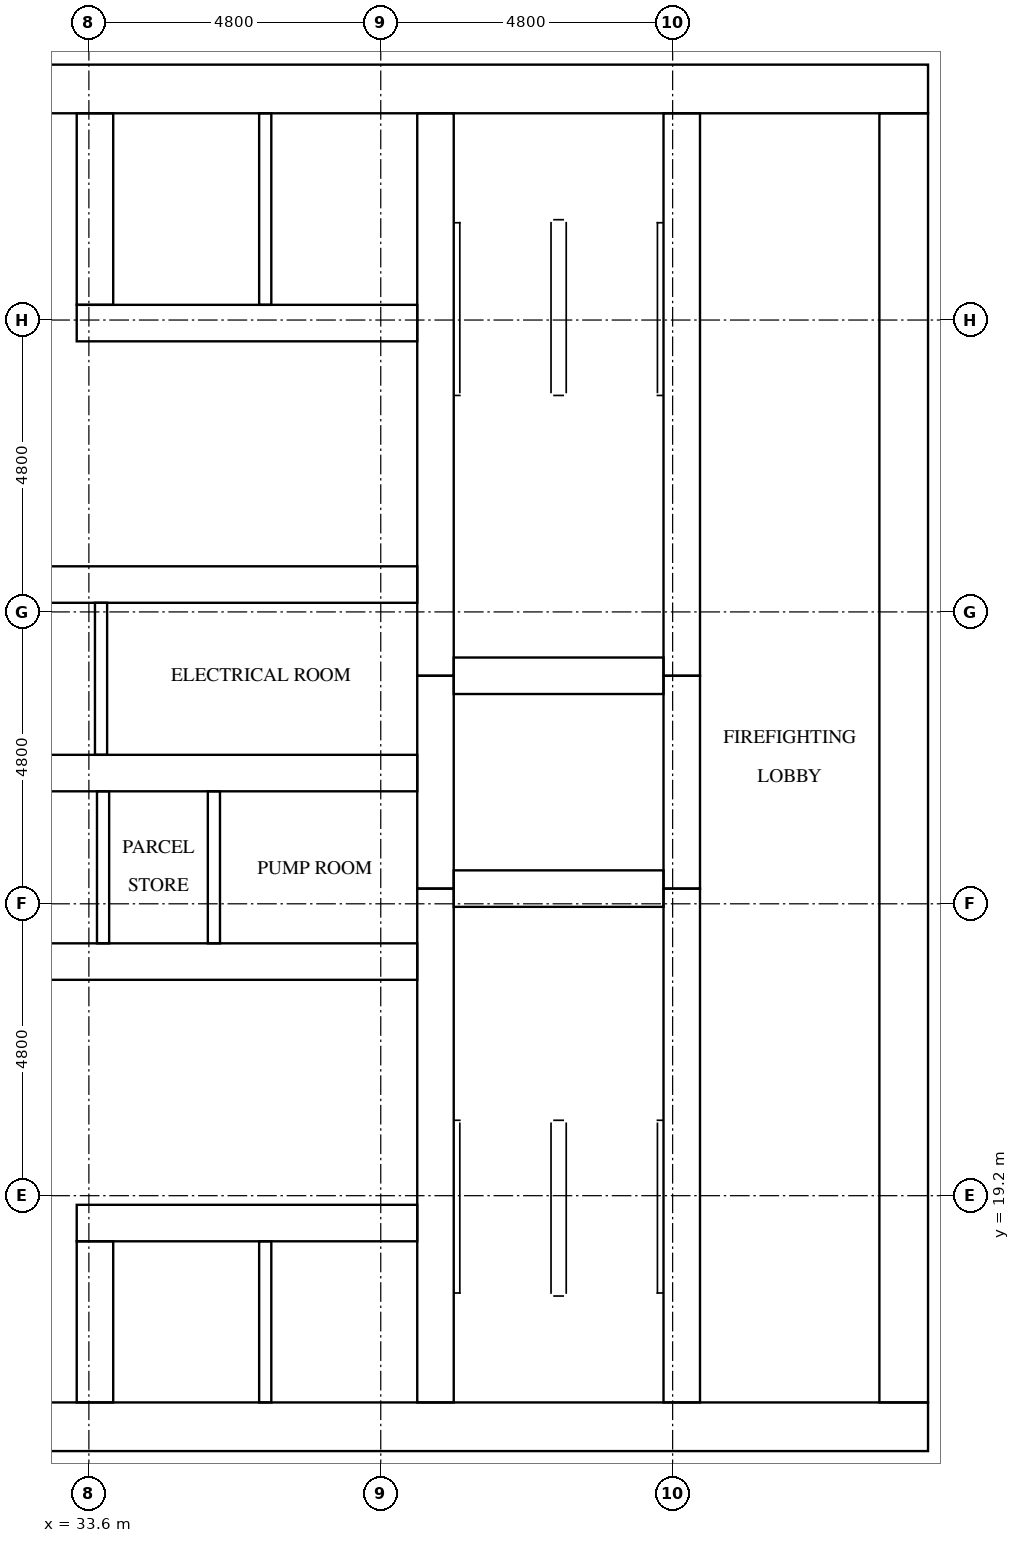
"""IFC4 building model, lengths in metres.
Left out: names, types, materials, properties, quantities, classifications, styles, units other than length and angle.
Written with IfcOpenShell. Run it as: python <this file> out.ifc"""

import sys

from ifc_helpers import new_model, si_unit, direction, frame, frame_2d, origin, place, context, subcontext, project, spatial, rectangle, extrude, element, fill, save


model = new_model("IFC4")
c1 = context("Model", 3, precision=1e-05, world=origin(), true_north=direction((0.0, 1.0)))
c2 = subcontext(c1, "Body", "Model", "MODEL_VIEW")
j1 = project(units=[si_unit("LENGTHUNIT", "METRE"), si_unit("PLANEANGLEUNIT", "RADIAN")], contexts=[c1])
p1 = place(None, origin())
s1 = spatial("IfcSite", under=j1, at=p1, CompositionType="ELEMENT")
p2 = place(p1, origin())
s2 = spatial("IfcBuilding", under=s1, at=p2, CompositionType="ELEMENT")
p3 = place(p2, frame((0.0, 0.0, 122.6)))
s3 = spatial("IfcBuildingStorey", under=s2, at=p3, CompositionType="ELEMENT", Elevation=122.6)
p4 = place(p3, frame((15.0, 15.4, 0.0), z_axis=(0.0, 0.0, 1.0), x_axis=(1.0, 0.0, 0.0)))
e1 = element("IfcWall", 1, at=p4, inside=s3, PredefinedType="SHEAR", context=c2, shape_type="SweptSolid", body=[
    extrude(rectangle(XDim=32.4, YDim=0.8, at=frame_2d((16.2, 0.0))), origin(), (0.0, 0.0, 1.0), 3.2),
])
p5 = place(p4, frame((15.3, 0.0, 0.0)))
e2 = element("IfcOpeningElement", 2, at=p5, cuts=e1, PredefinedType="OPENING", context=c2, shape_type="SweptSolid", body=[
    extrude(rectangle(XDim=1.8, YDim=2.1, at=frame_2d((0.9, 1.05))), frame((0.0, 0.41, 0.0), z_axis=(0.0, -1.0, 0.0), x_axis=(1.0, 0.0, 0.0)), (0.0, 0.0, 1.0), 0.82),
])
p6 = place(p3, frame((15.0, 37.4, 0.0), z_axis=(0.0, 0.0, 1.0), x_axis=(1.0, 0.0, 0.0)))
e3 = element("IfcWall", 3, at=p6, inside=s3, PredefinedType="SHEAR", context=c2, shape_type="SweptSolid", body=[
    extrude(rectangle(XDim=32.4, YDim=0.8, at=frame_2d((16.2, 0.0))), origin(), (0.0, 0.0, 1.0), 3.2),
])
p7 = place(p6, frame((15.3, 0.0, 0.0)))
e4 = element("IfcOpeningElement", 4, at=p7, cuts=e3, PredefinedType="OPENING", context=c2, shape_type="SweptSolid", body=[
    extrude(rectangle(XDim=1.8, YDim=2.1, at=frame_2d((0.9, 1.05))), frame((0.0, 0.41, 0.0), z_axis=(0.0, -1.0, 0.0), x_axis=(1.0, 0.0, 0.0)), (0.0, 0.0, 1.0), 0.82),
])
p8 = place(p6, frame((1.51, 0.0, 0.0)))
e5 = element("IfcOpeningElement", 5, at=p8, cuts=e3, PredefinedType="OPENING", context=c2, shape_type="SweptSolid", body=[
    extrude(rectangle(XDim=1.0, YDim=2.1, at=frame_2d((0.5, 1.05))), frame((0.0, 0.41, 0.0), z_axis=(0.0, -1.0, 0.0), x_axis=(1.0, 0.0, 0.0)), (0.0, 0.0, 1.0), 0.82),
])
p9 = place(p6, frame((5.11, 0.0, 0.0)))
e6 = element("IfcOpeningElement", 6, at=p9, cuts=e3, PredefinedType="OPENING", context=c2, shape_type="SweptSolid", body=[
    extrude(rectangle(XDim=1.0, YDim=2.1, at=frame_2d((0.5, 1.05))), frame((0.0, 0.41, 0.0), z_axis=(0.0, -1.0, 0.0), x_axis=(1.0, 0.0, 0.0)), (0.0, 0.0, 1.0), 0.82),
])
p10 = place(p3, frame((47.0, 15.8, 0.0), z_axis=(0.0, 0.0, 1.0), x_axis=(0.0, 1.0, 0.0)))
e7 = element("IfcWall", 7, at=p10, inside=s3, PredefinedType="SHEAR", context=c2, shape_type="SweptSolid", body=[
    extrude(rectangle(XDim=21.2, YDim=0.8, at=frame_2d((10.6, 0.0))), origin(), (0.0, 0.0, 1.0), 3.2),
])
p11 = place(p10, frame((10.3, 0.0, 0.0)))
e8 = element("IfcOpeningElement", 8, at=p11, cuts=e7, PredefinedType="OPENING", context=c2, shape_type="SweptSolid", body=[
    extrude(rectangle(XDim=1.2, YDim=2.1, at=frame_2d((0.6, 1.05))), frame((0.0, 0.41, 0.0), z_axis=(0.0, -1.0, 0.0), x_axis=(1.0, 0.0, 0.0)), (0.0, 0.0, 1.0), 0.82),
])
p12 = place(p3, frame((39.3, 15.8, 0.0), z_axis=(0.0, 0.0, 1.0), x_axis=(0.0, 1.0, 0.0)))
e9 = element("IfcWall", 9, at=p12, inside=s3, PredefinedType="SHEAR", context=c2, shape_type="SweptSolid", body=[
    extrude(rectangle(XDim=8.45, YDim=0.6, at=frame_2d((4.225, 0.0))), origin(), (0.0, 0.0, 1.0), 3.2),
])
p13 = place(p3, frame((39.3, 24.25, 0.0), z_axis=(0.0, 0.0, 1.0), x_axis=(0.0, 1.0, 0.0)))
e10 = element("IfcWall", 10, at=p13, inside=s3, PredefinedType="SHEAR", context=c2, shape_type="SweptSolid", body=[
    extrude(rectangle(XDim=3.5, YDim=0.6, at=frame_2d((1.75, 0.0))), origin(), (0.0, 0.0, 1.0), 3.2),
])
p14 = place(p3, frame((39.3, 27.75, 0.0), z_axis=(0.0, 0.0, 1.0), x_axis=(0.0, 1.0, 0.0)))
e11 = element("IfcWall", 11, at=p14, inside=s3, PredefinedType="SHEAR", context=c2, shape_type="SweptSolid", body=[
    extrude(rectangle(XDim=9.25, YDim=0.6, at=frame_2d((4.625, 0.0))), origin(), (0.0, 0.0, 1.0), 3.2),
])
p15 = place(p3, frame((43.35, 15.8, 0.0), z_axis=(0.0, 0.0, 1.0), x_axis=(0.0, 1.0, 0.0)))
e12 = element("IfcWall", 12, at=p15, inside=s3, PredefinedType="SHEAR", context=c2, shape_type="SweptSolid", body=[
    extrude(rectangle(XDim=8.45, YDim=0.6, at=frame_2d((4.225, 0.0))), origin(), (0.0, 0.0, 1.0), 3.2),
])
p16 = place(p15, frame((0.4, 0.0, 0.0)))
e13 = element("IfcOpeningElement", 13, at=p16, cuts=e12, PredefinedType="OPENING", context=c2, shape_type="SweptSolid", body=[
    extrude(rectangle(XDim=1.2, YDim=2.1, at=frame_2d((0.6, 1.05))), frame((0.0, 0.31, 0.0), z_axis=(0.0, -1.0, 0.0), x_axis=(1.0, 0.0, 0.0)), (0.0, 0.0, 1.0), 0.62),
])
p17 = place(p3, frame((43.35, 24.25, 0.0), z_axis=(0.0, 0.0, 1.0), x_axis=(0.0, 1.0, 0.0)))
e14 = element("IfcWall", 14, at=p17, inside=s3, PredefinedType="SHEAR", context=c2, shape_type="SweptSolid", body=[
    extrude(rectangle(XDim=3.5, YDim=0.6, at=frame_2d((1.75, 0.0))), origin(), (0.0, 0.0, 1.0), 3.2),
])
p18 = place(p17, frame((1.2, 0.0, 0.0)))
e15 = element("IfcOpeningElement", 15, at=p18, cuts=e14, PredefinedType="OPENING", context=c2, shape_type="SweptSolid", body=[
    extrude(rectangle(XDim=1.1, YDim=2.1, at=frame_2d((0.55, 1.05))), frame((0.0, 0.31, 0.0), z_axis=(0.0, -1.0, 0.0), x_axis=(1.0, 0.0, 0.0)), (0.0, 0.0, 1.0), 0.62),
])
p19 = place(p3, frame((43.35, 27.75, 0.0), z_axis=(0.0, 0.0, 1.0), x_axis=(0.0, 1.0, 0.0)))
e16 = element("IfcWall", 16, at=p19, inside=s3, PredefinedType="SHEAR", context=c2, shape_type="SweptSolid", body=[
    extrude(rectangle(XDim=9.25, YDim=0.6, at=frame_2d((4.625, 0.0))), origin(), (0.0, 0.0, 1.0), 3.2),
])
p20 = place(p19, frame((7.65, 0.0, 0.0)))
e17 = element("IfcOpeningElement", 17, at=p20, cuts=e16, PredefinedType="OPENING", context=c2, shape_type="SweptSolid", body=[
    extrude(rectangle(XDim=1.2, YDim=2.1, at=frame_2d((0.6, 1.05))), frame((0.0, 0.31, 0.0), z_axis=(0.0, -1.0, 0.0), x_axis=(1.0, 0.0, 0.0)), (0.0, 0.0, 1.0), 0.62),
])
for number, where, z_axis, x_axis in (
    (18, (39.6, 24.25, 0.0), (0.0, 0.0, 1.0), (1.0, 0.0, 0.0)),
    (19, (39.6, 27.75, 0.0), (0.0, 0.0, 1.0), (1.0, 0.0, 0.0)),
):
    element("IfcWall", number, at=place(p3, frame(where, z_axis=z_axis, x_axis=x_axis)), inside=s3, PredefinedType="SHEAR", context=c2, shape_type="SweptSolid", body=[
        extrude(rectangle(XDim=3.45, YDim=0.6, at=frame_2d((1.725, 0.0))), origin(), (0.0, 0.0, 1.0), 3.2),
    ])
p21 = place(p3, frame((33.4, 18.75, 0.0), z_axis=(0.0, 0.0, 1.0), x_axis=(1.0, 0.0, 0.0)))
e20 = element("IfcWall", 20, at=p21, inside=s3, PredefinedType="SHEAR", context=c2, shape_type="SweptSolid", body=[
    extrude(rectangle(XDim=5.6, YDim=0.6, at=frame_2d((2.8, 0.0))), origin(), (0.0, 0.0, 1.0), 3.2),
])
p22 = place(p21, frame((1.25, 0.0, 0.0)))
e21 = element("IfcOpeningElement", 21, at=p22, cuts=e20, PredefinedType="OPENING", context=c2, shape_type="SweptSolid", body=[
    extrude(rectangle(XDim=1.1, YDim=2.1, at=frame_2d((0.55, 1.05))), frame((0.0, 0.31, 0.0), z_axis=(0.0, -1.0, 0.0), x_axis=(1.0, 0.0, 0.0)), (0.0, 0.0, 1.0), 0.62),
])
p23 = place(p21, frame((3.85, 0.0, 0.0)))
e22 = element("IfcOpeningElement", 22, at=p23, cuts=e20, PredefinedType="OPENING", context=c2, shape_type="SweptSolid", body=[
    extrude(rectangle(XDim=1.1, YDim=2.1, at=frame_2d((0.55, 1.05))), frame((0.0, 0.31, 0.0), z_axis=(0.0, -1.0, 0.0), x_axis=(1.0, 0.0, 0.0)), (0.0, 0.0, 1.0), 0.62),
])
p24 = place(p3, frame((23.4, 23.05, 0.0), z_axis=(0.0, 0.0, 1.0), x_axis=(1.0, 0.0, 0.0)))
e23 = element("IfcWall", 23, at=p24, inside=s3, PredefinedType="SHEAR", context=c2, shape_type="SweptSolid", body=[
    extrude(rectangle(XDim=15.6, YDim=0.6, at=frame_2d((7.8, 0.0))), origin(), (0.0, 0.0, 1.0), 3.2),
])
p25 = place(p24, frame((0.311, 0.0, 0.0)))
e24 = element("IfcOpeningElement", 24, at=p25, cuts=e23, PredefinedType="OPENING", context=c2, shape_type="SweptSolid", body=[
    extrude(rectangle(XDim=1.0, YDim=2.1, at=frame_2d((0.5, 1.05))), frame((0.0, 0.31, 0.0), z_axis=(0.0, -1.0, 0.0), x_axis=(1.0, 0.0, 0.0)), (0.0, 0.0, 1.0), 0.62),
])
p26 = place(p24, frame((2.945, 0.0, 0.0)))
e25 = element("IfcOpeningElement", 25, at=p26, cuts=e23, PredefinedType="OPENING", context=c2, shape_type="SweptSolid", body=[
    extrude(rectangle(XDim=1.0, YDim=2.1, at=frame_2d((0.5, 1.05))), frame((0.0, 0.31, 0.0), z_axis=(0.0, -1.0, 0.0), x_axis=(1.0, 0.0, 0.0)), (0.0, 0.0, 1.0), 0.62),
])
p27 = place(p24, frame((10.845, 0.0, 0.0)))
e26 = element("IfcOpeningElement", 26, at=p27, cuts=e23, PredefinedType="OPENING", context=c2, shape_type="SweptSolid", body=[
    extrude(rectangle(XDim=1.0, YDim=2.1, at=frame_2d((0.5, 1.05))), frame((0.0, 0.31, 0.0), z_axis=(0.0, -1.0, 0.0), x_axis=(1.0, 0.0, 0.0)), (0.0, 0.0, 1.0), 0.62),
])
p28 = place(p24, frame((13.478, 0.0, 0.0)))
e27 = element("IfcOpeningElement", 27, at=p28, cuts=e23, PredefinedType="OPENING", context=c2, shape_type="SweptSolid", body=[
    extrude(rectangle(XDim=1.0, YDim=2.1, at=frame_2d((0.5, 1.05))), frame((0.0, 0.31, 0.0), z_axis=(0.0, -1.0, 0.0), x_axis=(1.0, 0.0, 0.0)), (0.0, 0.0, 1.0), 0.62),
])
p29 = place(p3, frame((23.4, 26.15, 0.0), z_axis=(0.0, 0.0, 1.0), x_axis=(1.0, 0.0, 0.0)))
e28 = element("IfcWall", 28, at=p29, inside=s3, PredefinedType="SHEAR", context=c2, shape_type="SweptSolid", body=[
    extrude(rectangle(XDim=15.6, YDim=0.6, at=frame_2d((7.8, 0.0))), origin(), (0.0, 0.0, 1.0), 3.2),
])
p30 = place(p3, frame((23.4, 29.25, 0.0), z_axis=(0.0, 0.0, 1.0), x_axis=(1.0, 0.0, 0.0)))
e29 = element("IfcWall", 29, at=p30, inside=s3, PredefinedType="SHEAR", context=c2, shape_type="SweptSolid", body=[
    extrude(rectangle(XDim=15.6, YDim=0.6, at=frame_2d((7.8, 0.0))), origin(), (0.0, 0.0, 1.0), 3.2),
])
p31 = place(p30, frame((2.05, 0.0, 0.0)))
e30 = element("IfcOpeningElement", 30, at=p31, cuts=e29, PredefinedType="OPENING", context=c2, shape_type="SweptSolid", body=[
    extrude(rectangle(XDim=1.0, YDim=2.1, at=frame_2d((0.5, 1.05))), frame((0.0, 0.31, 0.0), z_axis=(0.0, -1.0, 0.0), x_axis=(1.0, 0.0, 0.0)), (0.0, 0.0, 1.0), 0.62),
])
p32 = place(p30, frame((7.3, 0.0, 0.0)))
e31 = element("IfcOpeningElement", 31, at=p32, cuts=e29, PredefinedType="OPENING", context=c2, shape_type="SweptSolid", body=[
    extrude(rectangle(XDim=1.0, YDim=2.1, at=frame_2d((0.5, 1.05))), frame((0.0, 0.31, 0.0), z_axis=(0.0, -1.0, 0.0), x_axis=(1.0, 0.0, 0.0)), (0.0, 0.0, 1.0), 0.62),
])
p33 = place(p30, frame((12.55, 0.0, 0.0)))
e32 = element("IfcOpeningElement", 32, at=p33, cuts=e29, PredefinedType="OPENING", context=c2, shape_type="SweptSolid", body=[
    extrude(rectangle(XDim=1.0, YDim=2.1, at=frame_2d((0.5, 1.05))), frame((0.0, 0.31, 0.0), z_axis=(0.0, -1.0, 0.0), x_axis=(1.0, 0.0, 0.0)), (0.0, 0.0, 1.0), 0.62),
])
p34 = place(p3, frame((33.4, 33.55, 0.0), z_axis=(0.0, 0.0, 1.0), x_axis=(1.0, 0.0, 0.0)))
e33 = element("IfcWall", 33, at=p34, inside=s3, PredefinedType="SHEAR", context=c2, shape_type="SweptSolid", body=[
    extrude(rectangle(XDim=5.6, YDim=0.6, at=frame_2d((2.8, 0.0))), origin(), (0.0, 0.0, 1.0), 3.2),
])
p35 = place(p3, frame((33.7, 15.8, 0.0), z_axis=(0.0, 0.0, 1.0), x_axis=(0.0, 1.0, 0.0)))
e34 = element("IfcWall", 34, at=p35, inside=s3, PredefinedType="SHEAR", context=c2, shape_type="SweptSolid", body=[
    extrude(rectangle(XDim=2.65, YDim=0.6, at=frame_2d((1.325, 0.0))), origin(), (0.0, 0.0, 1.0), 3.2),
])
p36 = place(p3, frame((33.7, 33.85, 0.0), z_axis=(0.0, 0.0, 1.0), x_axis=(0.0, 1.0, 0.0)))
e35 = element("IfcWall", 35, at=p36, inside=s3, PredefinedType="SHEAR", context=c2, shape_type="SweptSolid", body=[
    extrude(rectangle(XDim=3.15, YDim=0.6, at=frame_2d((1.575, 0.0))), origin(), (0.0, 0.0, 1.0), 3.2),
])
p37 = place(p3, frame((33.833, 23.35, 0.0), z_axis=(0.0, 0.0, 1.0), x_axis=(0.0, 1.0, 0.0)))
e36 = element("IfcWall", 36, at=p37, inside=s3, PredefinedType="SOLIDWALL", context=c2, shape_type="SweptSolid", body=[
    extrude(rectangle(XDim=2.5, YDim=0.2, at=frame_2d((1.25, 0.0))), origin(), (0.0, 0.0, 1.0), 3.2),
])
p38 = place(p3, frame((36.5, 15.8, 0.0), z_axis=(0.0, 0.0, 1.0), x_axis=(0.0, 1.0, 0.0)))
e37 = element("IfcWall", 37, at=p38, inside=s3, PredefinedType="SOLIDWALL", context=c2, shape_type="SweptSolid", body=[
    extrude(rectangle(XDim=2.65, YDim=0.2, at=frame_2d((1.325, 0.0))), origin(), (0.0, 0.0, 1.0), 3.2),
])
p39 = place(p3, frame((36.5, 33.85, 0.0), z_axis=(0.0, 0.0, 1.0), x_axis=(0.0, 1.0, 0.0)))
e38 = element("IfcWall", 38, at=p39, inside=s3, PredefinedType="SOLIDWALL", context=c2, shape_type="SweptSolid", body=[
    extrude(rectangle(XDim=3.15, YDim=0.2, at=frame_2d((1.575, 0.0))), origin(), (0.0, 0.0, 1.0), 3.2),
])
for number, where, z_axis, x_axis in (
    (39, (35.656, 23.35, 0.0), (0.0, 0.0, 1.0), (0.0, 1.0, 0.0)),
    (40, (33.8, 26.45, 0.0), (0.0, 0.0, 1.0), (0.0, 1.0, 0.0)),
):
    element("IfcWall", number, at=place(p3, frame(where, z_axis=z_axis, x_axis=x_axis)), inside=s3, PredefinedType="PARTITIONING", context=c2, shape_type="SweptSolid", body=[
        extrude(rectangle(XDim=2.5, YDim=0.2, at=frame_2d((1.25, 0.0))), origin(), (0.0, 0.0, 1.0), 3.2),
    ])
p40 = place(p22, origin())
e41 = element("IfcDoor", 41, at=p40, inside=s3, OperationType="DOUBLE_DOOR_SLIDING", PredefinedType="DOOR", context=c2, shape_type="SweptSolid", body=[
    extrude(rectangle(XDim=1.1, YDim=2.1, at=frame_2d((0.55, 1.05))), frame((0.0, 0.025, 0.0), z_axis=(0.0, -1.0, 0.0), x_axis=(1.0, 0.0, 0.0)), (0.0, 0.0, 1.0), 0.05),
])
fill(e21, e41)
p41 = place(p23, origin())
e42 = element("IfcDoor", 42, at=p41, inside=s3, OperationType="DOUBLE_DOOR_SLIDING", PredefinedType="DOOR", context=c2, shape_type="SweptSolid", body=[
    extrude(rectangle(XDim=1.1, YDim=2.1, at=frame_2d((0.55, 1.05))), frame((0.0, 0.025, 0.0), z_axis=(0.0, -1.0, 0.0), x_axis=(1.0, 0.0, 0.0)), (0.0, 0.0, 1.0), 0.05),
])
fill(e22, e42)
p42 = place(p18, origin())
e43 = element("IfcDoor", 43, at=p42, inside=s3, OperationType="DOUBLE_DOOR_SLIDING", PredefinedType="DOOR", context=c2, shape_type="SweptSolid", body=[
    extrude(rectangle(XDim=1.1, YDim=2.1, at=frame_2d((0.55, 1.05))), frame((0.0, 0.025, 0.0), z_axis=(0.0, -1.0, 0.0), x_axis=(1.0, 0.0, 0.0)), (0.0, 0.0, 1.0), 0.05),
])
fill(e15, e43)
p43 = place(p16, origin())
e44 = element("IfcDoor", 44, at=p43, inside=s3, OperationType="SINGLE_SWING_RIGHT", PredefinedType="DOOR", context=c2, shape_type="SweptSolid", body=[
    extrude(rectangle(XDim=1.2, YDim=2.1, at=frame_2d((0.6, 1.05))), frame((0.0, 0.025, 0.0), z_axis=(0.0, -1.0, 0.0), x_axis=(1.0, 0.0, 0.0)), (0.0, 0.0, 1.0), 0.05),
])
fill(e13, e44)
p44 = place(p20, origin())
e45 = element("IfcDoor", 45, at=p44, inside=s3, OperationType="SINGLE_SWING_LEFT", PredefinedType="DOOR", context=c2, shape_type="SweptSolid", body=[
    extrude(rectangle(XDim=1.2, YDim=2.1, at=frame_2d((0.6, 1.05))), frame((0.0, 0.025, 0.0), z_axis=(0.0, -1.0, 0.0), x_axis=(1.0, 0.0, 0.0)), (0.0, 0.0, 1.0), 0.05),
])
fill(e17, e45)
p45 = place(p11, origin())
e46 = element("IfcDoor", 46, at=p45, inside=s3, OperationType="SINGLE_SWING_LEFT", PredefinedType="DOOR", context=c2, shape_type="SweptSolid", body=[
    extrude(rectangle(XDim=1.2, YDim=2.1, at=frame_2d((0.6, 1.05))), frame((0.0, 0.025, 0.0), z_axis=(0.0, -1.0, 0.0), x_axis=(1.0, 0.0, 0.0)), (0.0, 0.0, 1.0), 0.05),
])
fill(e8, e46)
p46 = place(p27, frame((1.0, 0.0, 0.0), z_axis=(0.0, 0.0, 1.0), x_axis=(-1.0, 0.0, 0.0)))
e47 = element("IfcDoor", 47, at=p46, inside=s3, OperationType="SINGLE_SWING_RIGHT", PredefinedType="DOOR", context=c2, shape_type="SweptSolid", body=[
    extrude(rectangle(XDim=1.0, YDim=2.1, at=frame_2d((0.5, 1.05))), frame((0.0, 0.025, 0.0), z_axis=(0.0, -1.0, 0.0), x_axis=(1.0, 0.0, 0.0)), (0.0, 0.0, 1.0), 0.05),
])
fill(e26, e47)
p47 = place(p28, frame((1.0, 0.0, 0.0), z_axis=(0.0, 0.0, 1.0), x_axis=(-1.0, 0.0, 0.0)))
e48 = element("IfcDoor", 48, at=p47, inside=s3, OperationType="SINGLE_SWING_LEFT", PredefinedType="DOOR", context=c2, shape_type="SweptSolid", body=[
    extrude(rectangle(XDim=1.0, YDim=2.1, at=frame_2d((0.5, 1.05))), frame((0.0, 0.025, 0.0), z_axis=(0.0, -1.0, 0.0), x_axis=(1.0, 0.0, 0.0)), (0.0, 0.0, 1.0), 0.05),
])
fill(e27, e48)
p48 = place(p33, origin())
e49 = element("IfcDoor", 49, at=p48, inside=s3, OperationType="SINGLE_SWING_RIGHT", PredefinedType="DOOR", context=c2, shape_type="SweptSolid", body=[
    extrude(rectangle(XDim=1.0, YDim=2.1, at=frame_2d((0.5, 1.05))), frame((0.0, 0.025, 0.0), z_axis=(0.0, -1.0, 0.0), x_axis=(1.0, 0.0, 0.0)), (0.0, 0.0, 1.0), 0.05),
])
fill(e32, e49)
save(model, sys.argv[1])
